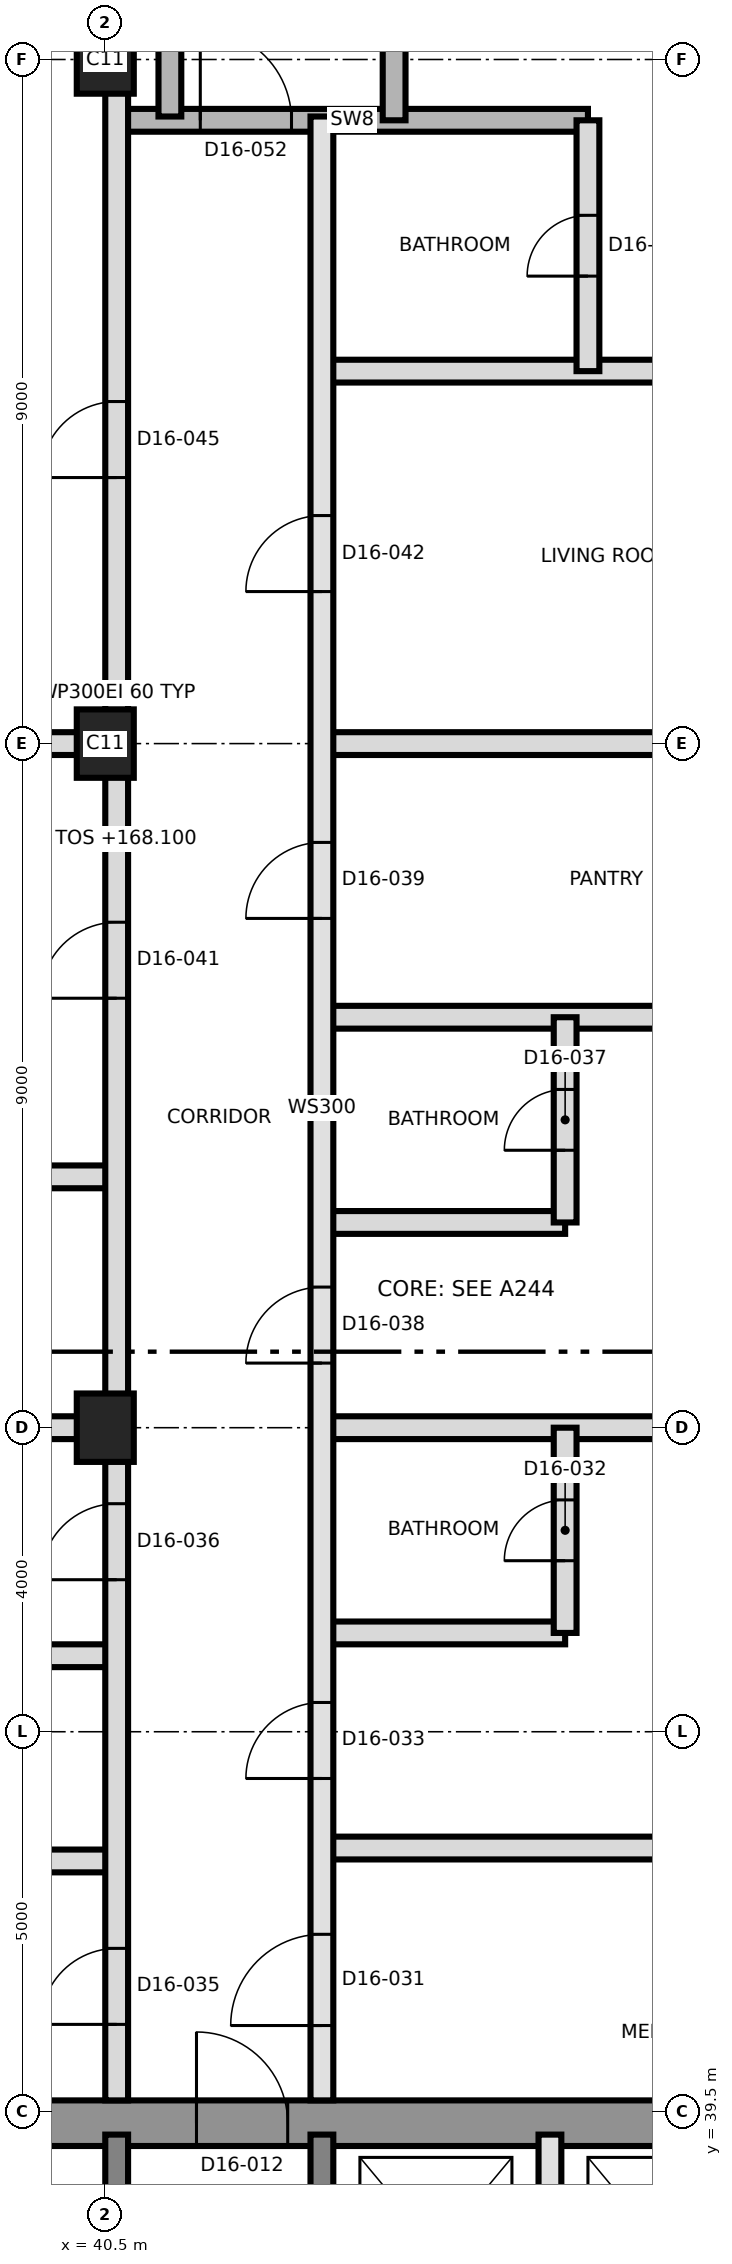
"""IFC4 building model, lengths in metres.
Left out: names, types, materials, properties, quantities, classifications, styles, units other than length and angle.
Written with IfcOpenShell. Run it as: python <this file> out.ifc"""

import sys

from ifc_helpers import new_model, si_unit, direction, frame, frame_2d, origin, origin_2d, place, context, subcontext, project, spatial, rectangle, extrude, element, fill, save


model = new_model("IFC4")
c1 = context("Model", 3, precision=1e-05, world=origin(), true_north=direction((0.0, 1.0)))
c2 = subcontext(c1, "Body", "Model", "MODEL_VIEW")
j1 = project(units=[si_unit("LENGTHUNIT", "METRE"), si_unit("PLANEANGLEUNIT", "RADIAN")], contexts=[c1])
p1 = place(None, origin())
s1 = spatial("IfcSite", under=j1, at=p1, CompositionType="ELEMENT")
p2 = place(p1, origin())
s2 = spatial("IfcBuilding", under=s1, at=p2, CompositionType="ELEMENT")
p3 = place(p2, frame((0.0, 0.0, 168.1)))
s3 = spatial("IfcBuildingStorey", under=s2, at=p3, CompositionType="ELEMENT", Elevation=168.1)
p4 = place(p3, frame((31.2, 39.35, 0.0), z_axis=(0.0, 0.0, 1.0), x_axis=(1.0, 0.0, 0.0)))
e1 = element("IfcWall", 1, at=p4, inside=s3, PredefinedType="SHEAR", context=c2, shape_type="SweptSolid", body=[
    extrude(rectangle(XDim=27.0, YDim=0.6, at=frame_2d((13.5, 0.0))), origin(), (0.0, 0.0, 1.0), 3.7),
])
p5 = place(p4, frame((10.5, 0.0, 0.0)))
e2 = element("IfcOpeningElement", 2, at=p5, cuts=e1, PredefinedType="OPENING", context=c2, shape_type="SweptSolid", body=[
    extrude(rectangle(XDim=1.2, YDim=2.1, at=frame_2d((0.6, 1.05))), frame((0.0, 0.31, 0.0), z_axis=(0.0, -1.0, 0.0), x_axis=(1.0, 0.0, 0.0)), (0.0, 0.0, 1.0), 0.62),
])
for number, where, z_axis, x_axis in (
    (3, (40.65, 33.5, 0.0), (0.0, 0.0, 1.0), (0.0, 1.0, 0.0)),
    (4, (43.35, 33.5, 0.0), (0.0, 0.0, 1.0), (0.0, 1.0, 0.0)),
):
    element("IfcWall", number, at=place(p3, frame(where, z_axis=z_axis, x_axis=x_axis)), inside=s3, PredefinedType="SHEAR", context=c2, shape_type="SweptSolid", body=[
        extrude(rectangle(XDim=5.7, YDim=0.3, at=frame_2d((2.85, 0.0))), origin(), (0.0, 0.0, 1.0), 3.7),
    ])
for number, where, z_axis, x_axis in (
    (5, (40.5, 48.5, 0.0), (0.0, 0.0, 1.0), (0.0, 1.0, 0.0)),
    (6, (40.5, 57.5, 0.0), (0.0, 0.0, 1.0), (0.0, 1.0, 0.0)),
    (7, (40.5, 66.5, 0.0), (0.0, 0.0, 1.0), (0.0, 1.0, 0.0)),
):
    element("IfcColumn", number, at=place(p3, frame(where, z_axis=z_axis, x_axis=x_axis)), inside=s3, PredefinedType="COLUMN", context=c2, shape_type="SweptSolid", body=[
        extrude(rectangle(XDim=0.9, YDim=0.75, at=origin_2d()), origin(), (0.0, 0.0, 1.0), 3.7),
    ])
p6 = place(p3, frame((46.35, 36.2, 0.0), z_axis=(0.0, 0.0, 1.0), x_axis=(0.0, 1.0, 0.0)))
e8 = element("IfcWall", 8, at=p6, inside=s3, PredefinedType="SOLIDWALL", context=c2, shape_type="SweptSolid", body=[
    extrude(rectangle(XDim=3.0, YDim=0.3, at=frame_2d((1.5, 0.0))), origin(), (0.0, 0.0, 1.0), 3.4),
])
p7 = place(p3, frame((37.45, 42.8, 0.0), z_axis=(0.0, 0.0, 1.0), x_axis=(1.0, 0.0, 0.0)))
e9 = element("IfcWall", 9, at=p7, inside=s3, PredefinedType="PARTITIONING", context=c2, shape_type="SweptSolid", body=[
    extrude(rectangle(XDim=3.2, YDim=0.3, at=frame_2d((1.6, 0.0))), origin(), (0.0, 0.0, 1.0), 3.4),
])
p8 = place(p3, frame((43.35, 42.97, 0.0), z_axis=(0.0, 0.0, 1.0), x_axis=(1.0, 0.0, 0.0)))
e10 = element("IfcWall", 10, at=p8, inside=s3, PredefinedType="PARTITIONING", context=c2, shape_type="SweptSolid", body=[
    extrude(rectangle(XDim=8.149, YDim=0.3, at=frame_2d((4.074, 0.0))), origin(), (0.0, 0.0, 1.0), 3.4),
])
p9 = place(p3, frame((30.565, 45.5, 0.0), z_axis=(0.0, 0.0, 1.0), x_axis=(1.0, 0.0, 0.0)))
e11 = element("IfcWall", 11, at=p9, inside=s3, PredefinedType="PARTITIONING", context=c2, shape_type="SweptSolid", body=[
    extrude(rectangle(XDim=10.085, YDim=0.3, at=frame_2d((5.042, 0.0))), origin(), (0.0, 0.0, 1.0), 3.4),
])
p10 = place(p3, frame((43.35, 45.8, 0.0), z_axis=(0.0, 0.0, 1.0), x_axis=(1.0, 0.0, 0.0)))
e12 = element("IfcWall", 12, at=p10, inside=s3, PredefinedType="PARTITIONING", context=c2, shape_type="SweptSolid", body=[
    extrude(rectangle(XDim=3.2, YDim=0.3, at=frame_2d((1.6, 0.0))), origin(), (0.0, 0.0, 1.0), 3.4),
])
p11 = place(p3, frame((30.565, 48.5, 0.0), z_axis=(0.0, 0.0, 1.0), x_axis=(1.0, 0.0, 0.0)))
e13 = element("IfcWall", 13, at=p11, inside=s3, PredefinedType="PARTITIONING", context=c2, shape_type="SweptSolid", body=[
    extrude(rectangle(XDim=10.085, YDim=0.3, at=frame_2d((5.042, 0.0))), origin(), (0.0, 0.0, 1.0), 3.4),
])
p12 = place(p3, frame((43.35, 48.5, 0.0), z_axis=(0.0, 0.0, 1.0), x_axis=(1.0, 0.0, 0.0)))
e14 = element("IfcWall", 14, at=p12, inside=s3, PredefinedType="PARTITIONING", context=c2, shape_type="SweptSolid", body=[
    extrude(rectangle(XDim=7.265, YDim=0.3, at=frame_2d((3.632, 0.0))), origin(), (0.0, 0.0, 1.0), 3.4),
])
p13 = place(p3, frame((43.35, 51.2, 0.0), z_axis=(0.0, 0.0, 1.0), x_axis=(1.0, 0.0, 0.0)))
e15 = element("IfcWall", 15, at=p13, inside=s3, PredefinedType="PARTITIONING", context=c2, shape_type="SweptSolid", body=[
    extrude(rectangle(XDim=3.2, YDim=0.3, at=frame_2d((1.6, 0.0))), origin(), (0.0, 0.0, 1.0), 3.4),
])
p14 = place(p3, frame((37.15, 51.8, 0.0), z_axis=(0.0, 0.0, 1.0), x_axis=(1.0, 0.0, 0.0)))
e16 = element("IfcWall", 16, at=p14, inside=s3, PredefinedType="PARTITIONING", context=c2, shape_type="SweptSolid", body=[
    extrude(rectangle(XDim=3.5, YDim=0.3, at=frame_2d((1.75, 0.0))), origin(), (0.0, 0.0, 1.0), 3.4),
])
p15 = place(p3, frame((43.35, 53.9, 0.0), z_axis=(0.0, 0.0, 1.0), x_axis=(1.0, 0.0, 0.0)))
e17 = element("IfcWall", 17, at=p15, inside=s3, PredefinedType="PARTITIONING", context=c2, shape_type="SweptSolid", body=[
    extrude(rectangle(XDim=7.265, YDim=0.3, at=frame_2d((3.632, 0.0))), origin(), (0.0, 0.0, 1.0), 3.4),
])
p16 = place(p3, frame((30.565, 57.5, 0.0), z_axis=(0.0, 0.0, 1.0), x_axis=(1.0, 0.0, 0.0)))
e18 = element("IfcWall", 18, at=p16, inside=s3, PredefinedType="PARTITIONING", context=c2, shape_type="SweptSolid", body=[
    extrude(rectangle(XDim=10.085, YDim=0.3, at=frame_2d((5.042, 0.0))), origin(), (0.0, 0.0, 1.0), 3.4),
])
p17 = place(p3, frame((43.35, 57.5, 0.0), z_axis=(0.0, 0.0, 1.0), x_axis=(1.0, 0.0, 0.0)))
e19 = element("IfcWall", 19, at=p17, inside=s3, PredefinedType="PARTITIONING", context=c2, shape_type="SweptSolid", body=[
    extrude(rectangle(XDim=7.265, YDim=0.3, at=frame_2d((3.632, 0.0))), origin(), (0.0, 0.0, 1.0), 3.4),
])
p18 = place(p3, frame((43.35, 62.4, 0.0), z_axis=(0.0, 0.0, 1.0), x_axis=(1.0, 0.0, 0.0)))
e20 = element("IfcWall", 20, at=p18, inside=s3, PredefinedType="PARTITIONING", context=c2, shape_type="SweptSolid", body=[
    extrude(rectangle(XDim=7.265, YDim=0.3, at=frame_2d((3.632, 0.0))), origin(), (0.0, 0.0, 1.0), 3.4),
])
p19 = place(p18, frame((4.65, 0.0, 0.0)))
e21 = element("IfcOpeningElement", 21, at=p19, cuts=e20, PredefinedType="OPENING", context=c2, shape_type="SweptSolid", body=[
    extrude(rectangle(XDim=1.0, YDim=2.1, at=frame_2d((0.5, 1.05))), frame((0.0, 0.16, 0.0), z_axis=(0.0, -1.0, 0.0), x_axis=(1.0, 0.0, 0.0)), (0.0, 0.0, 1.0), 0.32),
])
p20 = place(p3, frame((40.65, 65.7, 0.0), z_axis=(0.0, 0.0, 1.0), x_axis=(1.0, 0.0, 0.0)))
e22 = element("IfcWall", 22, at=p20, inside=s3, PredefinedType="SHEAR", context=c2, shape_type="SweptSolid", body=[
    extrude(rectangle(XDim=6.2, YDim=0.3, at=frame_2d((3.1, 0.0))), origin(), (0.0, 0.0, 1.0), 3.4),
])
p21 = place(p20, frame((1.1, 0.0, 0.0)))
e23 = element("IfcOpeningElement", 23, at=p21, cuts=e22, PredefinedType="OPENING", context=c2, shape_type="SweptSolid", body=[
    extrude(rectangle(XDim=1.2, YDim=2.1, at=frame_2d((0.6, 1.05))), frame((0.0, 0.16, 0.0), z_axis=(0.0, -1.0, 0.0), x_axis=(1.0, 0.0, 0.0)), (0.0, 0.0, 1.0), 0.32),
])
p22 = place(p3, frame((40.65, 39.65, 0.0), z_axis=(0.0, 0.0, 1.0), x_axis=(0.0, 1.0, 0.0)))
e24 = element("IfcWall", 24, at=p22, inside=s3, PredefinedType="PARTITIONING", context=c2, shape_type="SweptSolid", body=[
    extrude(rectangle(XDim=37.025, YDim=0.3, at=frame_2d((18.513, 0.0))), origin(), (0.0, 0.0, 1.0), 3.4),
])
p23 = place(p22, frame((1.0, 0.0, 0.0)))
e25 = element("IfcOpeningElement", 25, at=p23, cuts=e24, PredefinedType="OPENING", context=c2, shape_type="SweptSolid", body=[
    extrude(rectangle(XDim=1.0, YDim=2.1, at=frame_2d((0.5, 1.05))), frame((0.0, 0.16, 0.0), z_axis=(0.0, -1.0, 0.0), x_axis=(1.0, 0.0, 0.0)), (0.0, 0.0, 1.0), 0.32),
])
p24 = place(p22, frame((6.85, 0.0, 0.0)))
e26 = element("IfcOpeningElement", 26, at=p24, cuts=e24, PredefinedType="OPENING", context=c2, shape_type="SweptSolid", body=[
    extrude(rectangle(XDim=1.0, YDim=2.1, at=frame_2d((0.5, 1.05))), frame((0.0, 0.16, 0.0), z_axis=(0.0, -1.0, 0.0), x_axis=(1.0, 0.0, 0.0)), (0.0, 0.0, 1.0), 0.32),
])
p25 = place(p22, frame((14.5, 0.0, 0.0)))
e27 = element("IfcOpeningElement", 27, at=p25, cuts=e24, PredefinedType="OPENING", context=c2, shape_type="SweptSolid", body=[
    extrude(rectangle(XDim=1.0, YDim=2.4, at=frame_2d((0.5, 1.2))), frame((0.0, 0.16, 0.0), z_axis=(0.0, -1.0, 0.0), x_axis=(1.0, 0.0, 0.0)), (0.0, 0.0, 1.0), 0.32),
])
p26 = place(p22, frame((21.35, 0.0, 0.0)))
e28 = element("IfcOpeningElement", 28, at=p26, cuts=e24, PredefinedType="OPENING", context=c2, shape_type="SweptSolid", body=[
    extrude(rectangle(XDim=1.0, YDim=2.4, at=frame_2d((0.5, 1.2))), frame((0.0, 0.16, 0.0), z_axis=(0.0, -1.0, 0.0), x_axis=(1.0, 0.0, 0.0)), (0.0, 0.0, 1.0), 0.32),
])
p27 = place(p3, frame((41.35, 65.75, 0.0), z_axis=(0.0, 0.0, 1.0), x_axis=(0.0, 1.0, 0.0)))
e29 = element("IfcWall", 29, at=p27, inside=s3, PredefinedType="SHEAR", context=c2, shape_type="SweptSolid", body=[
    extrude(rectangle(XDim=8.85, YDim=0.3, at=frame_2d((4.425, 0.0))), origin(), (0.0, 0.0, 1.0), 3.4),
])
p28 = place(p3, frame((43.35, 39.65, 0.0), z_axis=(0.0, 0.0, 1.0), x_axis=(0.0, 1.0, 0.0)))
e30 = element("IfcWall", 30, at=p28, inside=s3, PredefinedType="SOLIDWALL", context=c2, shape_type="SweptSolid", body=[
    extrude(rectangle(XDim=26.1, YDim=0.3, at=frame_2d((13.05, 0.0))), origin(), (0.0, 0.0, 1.0), 3.4),
])
p29 = place(p28, frame((0.985, 0.0, 0.0)))
e31 = element("IfcOpeningElement", 31, at=p29, cuts=e30, PredefinedType="OPENING", context=c2, shape_type="SweptSolid", body=[
    extrude(rectangle(XDim=1.2, YDim=2.1, at=frame_2d((0.6, 1.05))), frame((0.0, 0.16, 0.0), z_axis=(0.0, -1.0, 0.0), x_axis=(1.0, 0.0, 0.0)), (0.0, 0.0, 1.0), 0.32),
])
p30 = place(p28, frame((4.235, 0.0, 0.0)))
e32 = element("IfcOpeningElement", 32, at=p30, cuts=e30, PredefinedType="OPENING", context=c2, shape_type="SweptSolid", body=[
    extrude(rectangle(XDim=1.0, YDim=2.1, at=frame_2d((0.5, 1.05))), frame((0.0, 0.16, 0.0), z_axis=(0.0, -1.0, 0.0), x_axis=(1.0, 0.0, 0.0)), (0.0, 0.0, 1.0), 0.32),
])
p31 = place(p28, frame((9.7, 0.0, 0.0)))
e33 = element("IfcOpeningElement", 33, at=p31, cuts=e30, PredefinedType="OPENING", context=c2, shape_type="SweptSolid", body=[
    extrude(rectangle(XDim=1.0, YDim=2.1, at=frame_2d((0.5, 1.05))), frame((0.0, 0.16, 0.0), z_axis=(0.0, -1.0, 0.0), x_axis=(1.0, 0.0, 0.0)), (0.0, 0.0, 1.0), 0.32),
])
p32 = place(p28, frame((15.55, 0.0, 0.0)))
e34 = element("IfcOpeningElement", 34, at=p32, cuts=e30, PredefinedType="OPENING", context=c2, shape_type="SweptSolid", body=[
    extrude(rectangle(XDim=1.0, YDim=2.1, at=frame_2d((0.5, 1.05))), frame((0.0, 0.16, 0.0), z_axis=(0.0, -1.0, 0.0), x_axis=(1.0, 0.0, 0.0)), (0.0, 0.0, 1.0), 0.32),
])
p33 = place(p28, frame((19.85, 0.0, 0.0)))
e35 = element("IfcOpeningElement", 35, at=p33, cuts=e30, PredefinedType="OPENING", context=c2, shape_type="SweptSolid", body=[
    extrude(rectangle(XDim=1.0, YDim=2.4, at=frame_2d((0.5, 1.2))), frame((0.0, 0.16, 0.0), z_axis=(0.0, -1.0, 0.0), x_axis=(1.0, 0.0, 0.0)), (0.0, 0.0, 1.0), 0.32),
])
p34 = place(p3, frame((44.3, 65.7, 0.0), z_axis=(0.0, 0.0, 1.0), x_axis=(0.0, 1.0, 0.0)))
e36 = element("IfcWall", 36, at=p34, inside=s3, PredefinedType="SHEAR", context=c2, shape_type="SweptSolid", body=[
    extrude(rectangle(XDim=8.9, YDim=0.3, at=frame_2d((4.45, 0.0))), origin(), (0.0, 0.0, 1.0), 3.4),
])
p35 = place(p3, frame((46.55, 45.8, 0.0), z_axis=(0.0, 0.0, 1.0), x_axis=(0.0, 1.0, 0.0)))
e37 = element("IfcWall", 37, at=p35, inside=s3, PredefinedType="PARTITIONING", context=c2, shape_type="SweptSolid", body=[
    extrude(rectangle(XDim=2.7, YDim=0.3, at=frame_2d((1.35, 0.0))), origin(), (0.0, 0.0, 1.0), 3.4),
])
p36 = place(p35, frame((0.95, 0.0, 0.0)))
e38 = element("IfcOpeningElement", 38, at=p36, cuts=e37, PredefinedType="OPENING", context=c2, shape_type="SweptSolid", body=[
    extrude(rectangle(XDim=0.8, YDim=2.1, at=frame_2d((0.4, 1.05))), frame((0.0, 0.16, 0.0), z_axis=(0.0, -1.0, 0.0), x_axis=(1.0, 0.0, 0.0)), (0.0, 0.0, 1.0), 0.32),
])
p37 = place(p3, frame((46.55, 51.2, 0.0), z_axis=(0.0, 0.0, 1.0), x_axis=(0.0, 1.0, 0.0)))
e39 = element("IfcWall", 39, at=p37, inside=s3, PredefinedType="PARTITIONING", context=c2, shape_type="SweptSolid", body=[
    extrude(rectangle(XDim=2.7, YDim=0.3, at=frame_2d((1.35, 0.0))), origin(), (0.0, 0.0, 1.0), 3.4),
])
p38 = place(p37, frame((0.95, 0.0, 0.0)))
e40 = element("IfcOpeningElement", 40, at=p38, cuts=e39, PredefinedType="OPENING", context=c2, shape_type="SweptSolid", body=[
    extrude(rectangle(XDim=0.8, YDim=2.1, at=frame_2d((0.4, 1.05))), frame((0.0, 0.16, 0.0), z_axis=(0.0, -1.0, 0.0), x_axis=(1.0, 0.0, 0.0)), (0.0, 0.0, 1.0), 0.32),
])
p39 = place(p3, frame((46.85, 62.4, 0.0), z_axis=(0.0, 0.0, 1.0), x_axis=(0.0, 1.0, 0.0)))
e41 = element("IfcWall", 41, at=p39, inside=s3, PredefinedType="PARTITIONING", context=c2, shape_type="SweptSolid", body=[
    extrude(rectangle(XDim=3.3, YDim=0.3, at=frame_2d((1.65, 0.0))), origin(), (0.0, 0.0, 1.0), 3.4),
])
p40 = place(p39, frame((1.25, 0.0, 0.0)))
e42 = element("IfcOpeningElement", 42, at=p40, cuts=e41, PredefinedType="OPENING", context=c2, shape_type="SweptSolid", body=[
    extrude(rectangle(XDim=0.8, YDim=2.1, at=frame_2d((0.4, 1.05))), frame((0.0, 0.16, 0.0), z_axis=(0.0, -1.0, 0.0), x_axis=(1.0, 0.0, 0.0)), (0.0, 0.0, 1.0), 0.32),
])
p41 = place(p5, origin())
e43 = element("IfcDoor", 43, at=p41, inside=s3, OperationType="SINGLE_SWING_RIGHT", PredefinedType="DOOR", context=c2, shape_type="SweptSolid", body=[
    extrude(rectangle(XDim=1.2, YDim=2.1, at=frame_2d((0.6, 1.05))), frame((0.0, 0.025, 0.0), z_axis=(0.0, -1.0, 0.0), x_axis=(1.0, 0.0, 0.0)), (0.0, 0.0, 1.0), 0.05),
])
fill(e2, e43)
p42 = place(p29, origin())
e44 = element("IfcDoor", 44, at=p42, inside=s3, OperationType="SINGLE_SWING_RIGHT", PredefinedType="DOOR", context=c2, shape_type="SweptSolid", body=[
    extrude(rectangle(XDim=1.2, YDim=2.1, at=frame_2d((0.6, 1.05))), frame((0.0, 0.025, 0.0), z_axis=(0.0, -1.0, 0.0), x_axis=(1.0, 0.0, 0.0)), (0.0, 0.0, 1.0), 0.05),
])
fill(e31, e44)
p43 = place(p36, origin())
e45 = element("IfcDoor", 45, at=p43, inside=s3, OperationType="SINGLE_SWING_LEFT", PredefinedType="DOOR", context=c2, shape_type="SweptSolid", body=[
    extrude(rectangle(XDim=0.8, YDim=2.1, at=frame_2d((0.4, 1.05))), frame((0.0, 0.025, 0.0), z_axis=(0.0, -1.0, 0.0), x_axis=(1.0, 0.0, 0.0)), (0.0, 0.0, 1.0), 0.05),
])
fill(e38, e45)
p44 = place(p30, origin())
e46 = element("IfcDoor", 46, at=p44, inside=s3, OperationType="SINGLE_SWING_LEFT", PredefinedType="DOOR", context=c2, shape_type="SweptSolid", body=[
    extrude(rectangle(XDim=1.0, YDim=2.1, at=frame_2d((0.5, 1.05))), frame((0.0, 0.025, 0.0), z_axis=(0.0, -1.0, 0.0), x_axis=(1.0, 0.0, 0.0)), (0.0, 0.0, 1.0), 0.05),
])
fill(e32, e46)
p45 = place(p23, origin())
e47 = element("IfcDoor", 47, at=p45, inside=s3, OperationType="SINGLE_SWING_RIGHT", PredefinedType="DOOR", context=c2, shape_type="SweptSolid", body=[
    extrude(rectangle(XDim=1.0, YDim=2.1, at=frame_2d((0.5, 1.05))), frame((0.0, 0.025, 0.0), z_axis=(0.0, -1.0, 0.0), x_axis=(1.0, 0.0, 0.0)), (0.0, 0.0, 1.0), 0.05),
])
fill(e25, e47)
p46 = place(p24, origin())
e48 = element("IfcDoor", 48, at=p46, inside=s3, OperationType="SINGLE_SWING_LEFT", PredefinedType="DOOR", context=c2, shape_type="SweptSolid", body=[
    extrude(rectangle(XDim=1.0, YDim=2.1, at=frame_2d((0.5, 1.05))), frame((0.0, 0.025, 0.0), z_axis=(0.0, -1.0, 0.0), x_axis=(1.0, 0.0, 0.0)), (0.0, 0.0, 1.0), 0.05),
])
fill(e26, e48)
p47 = place(p38, origin())
e49 = element("IfcDoor", 49, at=p47, inside=s3, OperationType="SINGLE_SWING_LEFT", PredefinedType="DOOR", context=c2, shape_type="SweptSolid", body=[
    extrude(rectangle(XDim=0.8, YDim=2.1, at=frame_2d((0.4, 1.05))), frame((0.0, 0.025, 0.0), z_axis=(0.0, -1.0, 0.0), x_axis=(1.0, 0.0, 0.0)), (0.0, 0.0, 1.0), 0.05),
])
fill(e40, e49)
p48 = place(p31, origin())
e50 = element("IfcDoor", 50, at=p48, inside=s3, OperationType="SINGLE_SWING_RIGHT", PredefinedType="DOOR", context=c2, shape_type="SweptSolid", body=[
    extrude(rectangle(XDim=1.0, YDim=2.1, at=frame_2d((0.5, 1.05))), frame((0.0, 0.025, 0.0), z_axis=(0.0, -1.0, 0.0), x_axis=(1.0, 0.0, 0.0)), (0.0, 0.0, 1.0), 0.05),
])
fill(e33, e50)
p49 = place(p32, origin())
e51 = element("IfcDoor", 51, at=p49, inside=s3, OperationType="SINGLE_SWING_LEFT", PredefinedType="DOOR", context=c2, shape_type="SweptSolid", body=[
    extrude(rectangle(XDim=1.0, YDim=2.1, at=frame_2d((0.5, 1.05))), frame((0.0, 0.025, 0.0), z_axis=(0.0, -1.0, 0.0), x_axis=(1.0, 0.0, 0.0)), (0.0, 0.0, 1.0), 0.05),
])
fill(e34, e51)
p50 = place(p25, origin())
e52 = element("IfcDoor", 52, at=p50, inside=s3, OperationType="SINGLE_SWING_RIGHT", PredefinedType="DOOR", context=c2, shape_type="SweptSolid", body=[
    extrude(rectangle(XDim=1.0, YDim=2.4, at=frame_2d((0.5, 1.2))), frame((0.0, 0.025, 0.0), z_axis=(0.0, -1.0, 0.0), x_axis=(1.0, 0.0, 0.0)), (0.0, 0.0, 1.0), 0.05),
])
fill(e27, e52)
p51 = place(p33, origin())
e53 = element("IfcDoor", 53, at=p51, inside=s3, OperationType="SINGLE_SWING_LEFT", PredefinedType="DOOR", context=c2, shape_type="SweptSolid", body=[
    extrude(rectangle(XDim=1.0, YDim=2.4, at=frame_2d((0.5, 1.2))), frame((0.0, 0.025, 0.0), z_axis=(0.0, -1.0, 0.0), x_axis=(1.0, 0.0, 0.0)), (0.0, 0.0, 1.0), 0.05),
])
fill(e35, e53)
p52 = place(p40, origin())
e54 = element("IfcDoor", 54, at=p52, inside=s3, OperationType="SINGLE_SWING_LEFT", PredefinedType="DOOR", context=c2, shape_type="SweptSolid", body=[
    extrude(rectangle(XDim=0.8, YDim=2.1, at=frame_2d((0.4, 1.05))), frame((0.0, 0.025, 0.0), z_axis=(0.0, -1.0, 0.0), x_axis=(1.0, 0.0, 0.0)), (0.0, 0.0, 1.0), 0.05),
])
fill(e42, e54)
p53 = place(p26, origin())
e55 = element("IfcDoor", 55, at=p53, inside=s3, OperationType="SINGLE_SWING_LEFT", PredefinedType="DOOR", context=c2, shape_type="SweptSolid", body=[
    extrude(rectangle(XDim=1.0, YDim=2.4, at=frame_2d((0.5, 1.2))), frame((0.0, 0.025, 0.0), z_axis=(0.0, -1.0, 0.0), x_axis=(1.0, 0.0, 0.0)), (0.0, 0.0, 1.0), 0.05),
])
fill(e28, e55)
p54 = place(p21, origin())
e56 = element("IfcDoor", 56, at=p54, inside=s3, OperationType="SINGLE_SWING_RIGHT", PredefinedType="DOOR", context=c2, shape_type="SweptSolid", body=[
    extrude(rectangle(XDim=1.2, YDim=2.1, at=frame_2d((0.6, 1.05))), frame((0.0, 0.025, 0.0), z_axis=(0.0, -1.0, 0.0), x_axis=(1.0, 0.0, 0.0)), (0.0, 0.0, 1.0), 0.05),
])
fill(e23, e56)
save(model, sys.argv[1])
